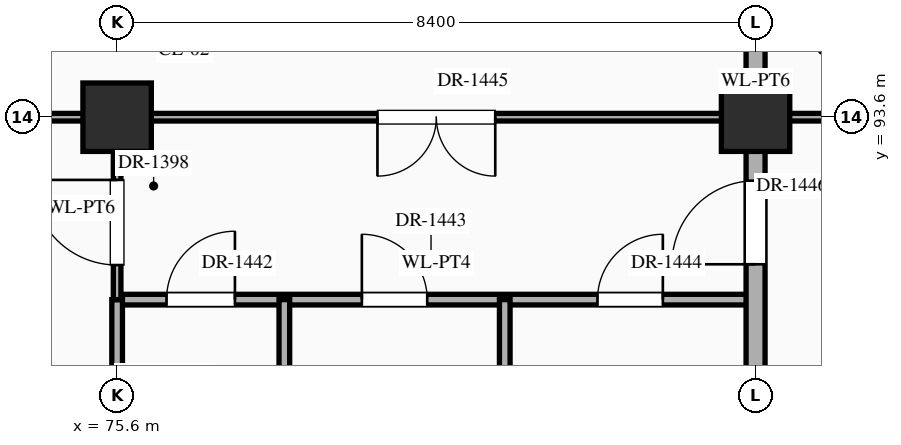
"""IFC4 building model, lengths in metres.
Left out: names, types, materials, properties, quantities, classifications, styles, units other than length and angle.
Written with IfcOpenShell. Run it as: python <this file> out.ifc"""

import sys

from ifc_helpers import new_model, si_unit, direction, frame, frame_2d, origin, origin_2d, place, context, subcontext, project, spatial, rectangle, extrude, element, fill, save


model = new_model("IFC4")
c1 = context("Model", 3, precision=1e-05, world=origin(), true_north=direction((0.0, 1.0)))
c2 = subcontext(c1, "Body", "Model", "MODEL_VIEW")
j1 = project(units=[si_unit("LENGTHUNIT", "METRE"), si_unit("PLANEANGLEUNIT", "RADIAN")], contexts=[c1])
p1 = place(None, origin())
s1 = spatial("IfcSite", under=j1, at=p1, CompositionType="ELEMENT")
p2 = place(p1, origin())
s2 = spatial("IfcBuilding", under=s1, at=p2, CompositionType="ELEMENT")
p3 = place(p2, frame((0.0, 0.0, 10.8)))
s3 = spatial("IfcBuildingStorey", under=s2, at=p3, CompositionType="ELEMENT", Elevation=10.8)
for number, where, z_axis, x_axis in (
    (1, (75.6, 93.6, 0.0), (0.0, 0.0, 1.0), (1.0, 0.0, 0.0)),
    (2, (84.0, 93.6, 0.0), (0.0, 0.0, 1.0), (1.0, 0.0, 0.0)),
):
    element("IfcColumn", number, at=place(p3, frame(where, z_axis=z_axis, x_axis=x_axis)), inside=s3, PredefinedType="COLUMN", context=c2, shape_type="SweptSolid", body=[
        extrude(rectangle(XDim=0.9, YDim=0.9, at=origin_2d()), origin(), (0.0, 0.0, 1.0), 5.4),
    ])
p4 = place(p3, frame((75.6, 91.2, 0.0), z_axis=(0.0, 0.0, 1.0), x_axis=(1.0, 0.0, 0.0)))
e3 = element("IfcWall", 3, at=p4, inside=s3, PredefinedType="STANDARD", context=c2, shape_type="SweptSolid", body=[
    extrude(rectangle(XDim=8.4, YDim=0.14, at=frame_2d((4.2, 0.0))), origin(), (0.0, 0.0, 1.0), 5.12),
])
p5 = place(p4, frame((0.65, 0.0, 0.0)))
e4 = element("IfcOpeningElement", 4, at=p5, cuts=e3, PredefinedType="OPENING", context=c2, shape_type="SweptSolid", body=[
    extrude(rectangle(XDim=0.9, YDim=2.15, at=frame_2d((0.45, 1.075))), frame((0.0, 0.082, 0.0), z_axis=(0.0, -1.0, 0.0), x_axis=(1.0, 0.0, 0.0)), (0.0, 0.0, 1.0), 0.164),
])
p6 = place(p4, frame((3.22, 0.0, 0.0)))
e5 = element("IfcOpeningElement", 5, at=p6, cuts=e3, PredefinedType="OPENING", context=c2, shape_type="SweptSolid", body=[
    extrude(rectangle(XDim=0.86, YDim=2.1, at=frame_2d((0.43, 1.05))), frame((0.0, 0.082, 0.0), z_axis=(0.0, -1.0, 0.0), x_axis=(1.0, 0.0, 0.0)), (0.0, 0.0, 1.0), 0.164),
])
p7 = place(p4, frame((6.32, 0.0, 0.0)))
e6 = element("IfcOpeningElement", 6, at=p7, cuts=e3, PredefinedType="OPENING", context=c2, shape_type="SweptSolid", body=[
    extrude(rectangle(XDim=0.86, YDim=2.1, at=frame_2d((0.43, 1.05))), frame((0.0, 0.082, 0.0), z_axis=(0.0, -1.0, 0.0), x_axis=(1.0, 0.0, 0.0)), (0.0, 0.0, 1.0), 0.164),
])
p8 = place(p3, frame((67.2, 93.6, 0.0), z_axis=(0.0, 0.0, 1.0), x_axis=(1.0, 0.0, 0.0)))
e7 = element("IfcWall", 7, at=p8, inside=s3, PredefinedType="STANDARD", context=c2, shape_type="SweptSolid", body=[
    extrude(rectangle(XDim=33.6, YDim=0.1, at=frame_2d((16.8, 0.0))), origin(), (0.0, 0.0, 1.0), 4.27),
])
p9 = place(p8, frame((3.475, 0.0, 0.0)))
e8 = element("IfcOpeningElement", 8, at=p9, cuts=e7, PredefinedType="OPENING", context=c2, shape_type="SweptSolid", body=[
    extrude(rectangle(XDim=1.45, YDim=2.3, at=frame_2d((0.725, 1.15))), frame((0.0, 0.062, 0.0), z_axis=(0.0, -1.0, 0.0), x_axis=(1.0, 0.0, 0.0)), (0.0, 0.0, 1.0), 0.124),
])
p10 = place(p8, frame((28.45, 0.0, 0.0)))
e9 = element("IfcOpeningElement", 9, at=p10, cuts=e7, PredefinedType="OPENING", context=c2, shape_type="SweptSolid", body=[
    extrude(rectangle(XDim=1.9, YDim=2.5, at=frame_2d((0.95, 1.25))), frame((0.0, 0.062, 0.0), z_axis=(0.0, -1.0, 0.0), x_axis=(1.0, 0.0, 0.0)), (0.0, 0.0, 1.0), 0.124),
])
p11 = place(p8, frame((11.825, 0.0, 0.0)))
e10 = element("IfcOpeningElement", 10, at=p11, cuts=e7, PredefinedType="OPENING", context=c2, shape_type="SweptSolid", body=[
    extrude(rectangle(XDim=1.55, YDim=2.35, at=frame_2d((0.775, 1.175))), frame((0.0, 0.062, 0.0), z_axis=(0.0, -1.0, 0.0), x_axis=(1.0, 0.0, 0.0)), (0.0, 0.0, 1.0), 0.124),
])
p12 = place(p8, frame((17.785, 0.0, 0.0)))
e11 = element("IfcOpeningElement", 11, at=p12, cuts=e7, PredefinedType="OPENING", context=c2, shape_type="SweptSolid", body=[
    extrude(rectangle(XDim=1.2, YDim=2.35, at=frame_2d((0.6, 1.175))), frame((0.0, 0.062, 0.0), z_axis=(0.0, -1.0, 0.0), x_axis=(1.0, 0.0, 0.0)), (0.0, 0.0, 1.0), 0.124),
])
p13 = place(p8, frame((20.38, 0.0, 0.0)))
e12 = element("IfcOpeningElement", 12, at=p13, cuts=e7, PredefinedType="OPENING", context=c2, shape_type="SweptSolid", body=[
    extrude(rectangle(XDim=1.24, YDim=2.3, at=frame_2d((0.62, 1.15))), frame((0.0, 0.062, 0.0), z_axis=(0.0, -1.0, 0.0), x_axis=(1.0, 0.0, 0.0)), (0.0, 0.0, 1.0), 0.124),
])
p14 = place(p8, frame((22.975, 0.0, 0.0)))
e13 = element("IfcOpeningElement", 13, at=p14, cuts=e7, PredefinedType="OPENING", context=c2, shape_type="SweptSolid", body=[
    extrude(rectangle(XDim=1.28, YDim=2.35, at=frame_2d((0.64, 1.175))), frame((0.0, 0.062, 0.0), z_axis=(0.0, -1.0, 0.0), x_axis=(1.0, 0.0, 0.0)), (0.0, 0.0, 1.0), 0.124),
])
p15 = place(p3, frame((75.6, 89.2, 0.0), z_axis=(0.0, 0.0, 1.0), x_axis=(0.0, 1.0, 0.0)))
e14 = element("IfcWall", 14, at=p15, inside=s3, PredefinedType="STANDARD", context=c2, shape_type="SweptSolid", body=[
    extrude(rectangle(XDim=2.0, YDim=0.14, at=frame_2d((1.0, 0.0))), origin(), (0.0, 0.0, 1.0), 4.37),
])
p16 = place(p3, frame((75.6, 91.2, 0.0), z_axis=(0.0, 0.0, 1.0), x_axis=(0.0, 1.0, 0.0)))
e15 = element("IfcWall", 15, at=p16, inside=s3, PredefinedType="STANDARD", context=c2, shape_type="SweptSolid", body=[
    extrude(rectangle(XDim=2.4, YDim=0.1, at=frame_2d((1.2, 0.0))), origin(), (0.0, 0.0, 1.0), 4.37),
])
p17 = place(p16, frame((0.455, 0.0, 0.0)))
e16 = element("IfcOpeningElement", 16, at=p17, cuts=e15, PredefinedType="OPENING", context=c2, shape_type="SweptSolid", body=[
    extrude(rectangle(XDim=1.12, YDim=2.25, at=frame_2d((0.56, 1.125))), frame((0.0, 0.062, 0.0), z_axis=(0.0, -1.0, 0.0), x_axis=(1.0, 0.0, 0.0)), (0.0, 0.0, 1.0), 0.124),
])
for number, where, z_axis, x_axis in (
    (17, (77.8, 86.4, 0.0), (0.0, 0.0, 1.0), (0.0, 1.0, 0.0)),
    (18, (80.7, 86.4, 0.0), (0.0, 0.0, 1.0), (0.0, 1.0, 0.0)),
):
    element("IfcWall", number, at=place(p3, frame(where, z_axis=z_axis, x_axis=x_axis)), inside=s3, PredefinedType="STANDARD", context=c2, shape_type="SweptSolid", body=[
        extrude(rectangle(XDim=4.8, YDim=0.14, at=frame_2d((2.4, 0.0))), origin(), (0.0, 0.0, 1.0), 5.12),
    ])
p18 = place(p3, frame((84.0, 79.2, 0.0), z_axis=(0.0, 0.0, 1.0), x_axis=(0.0, 1.0, 0.0)))
e19 = element("IfcWall", 19, at=p18, inside=s3, PredefinedType="STANDARD", context=c2, shape_type="SweptSolid", body=[
    extrude(rectangle(XDim=35.96, YDim=0.25, at=frame_2d((17.98, 0.0))), origin(), (0.0, 0.0, 1.0), 4.37),
])
p19 = place(p18, frame((22.835, 0.0, 0.0)))
e20 = element("IfcOpeningElement", 20, at=p19, cuts=e19, PredefinedType="OPENING", context=c2, shape_type="SweptSolid", body=[
    extrude(rectangle(XDim=1.5, YDim=2.25, at=frame_2d((0.75, 1.125))), frame((0.0, 0.137, 0.0), z_axis=(0.0, -1.0, 0.0), x_axis=(1.0, 0.0, 0.0)), (0.0, 0.0, 1.0), 0.274),
])
p20 = place(p18, frame((12.465, 0.0, 0.0)))
e21 = element("IfcOpeningElement", 21, at=p20, cuts=e19, PredefinedType="OPENING", context=c2, shape_type="SweptSolid", body=[
    extrude(rectangle(XDim=1.1, YDim=2.2, at=frame_2d((0.55, 1.1))), frame((0.0, 0.137, 0.0), z_axis=(0.0, -1.0, 0.0), x_axis=(1.0, 0.0, 0.0)), (0.0, 0.0, 1.0), 0.274),
])
p21 = place(p18, frame((15.31, 0.0, 0.0)))
e22 = element("IfcOpeningElement", 22, at=p21, cuts=e19, PredefinedType="OPENING", context=c2, shape_type="SweptSolid", body=[
    extrude(rectangle(XDim=0.95, YDim=2.15, at=frame_2d((0.475, 1.075))), frame((0.0, 0.137, 0.0), z_axis=(0.0, -1.0, 0.0), x_axis=(1.0, 0.0, 0.0)), (0.0, 0.0, 1.0), 0.274),
])
p22 = place(p18, frame((25.915, 0.0, 0.0)))
e23 = element("IfcOpeningElement", 23, at=p22, cuts=e19, PredefinedType="OPENING", context=c2, shape_type="SweptSolid", body=[
    extrude(rectangle(XDim=1.8, YDim=2.35, at=frame_2d((0.9, 1.175))), frame((0.0, 0.137, 0.0), z_axis=(0.0, -1.0, 0.0), x_axis=(1.0, 0.0, 0.0)), (0.0, 0.0, 1.0), 0.274),
])
p23 = place(p18, frame((29.71, 0.0, 0.0)))
e24 = element("IfcOpeningElement", 24, at=p23, cuts=e19, PredefinedType="OPENING", context=c2, shape_type="SweptSolid", body=[
    extrude(rectangle(XDim=0.95, YDim=2.15, at=frame_2d((0.475, 1.075))), frame((0.0, 0.137, 0.0), z_axis=(0.0, -1.0, 0.0), x_axis=(1.0, 0.0, 0.0)), (0.0, 0.0, 1.0), 0.274),
])
p24 = place(p18, frame((5.265, 0.0, 0.0)))
e25 = element("IfcOpeningElement", 25, at=p24, cuts=e19, PredefinedType="OPENING", context=c2, shape_type="SweptSolid", body=[
    extrude(rectangle(XDim=1.1, YDim=2.2, at=frame_2d((0.55, 1.1))), frame((0.0, 0.137, 0.0), z_axis=(0.0, -1.0, 0.0), x_axis=(1.0, 0.0, 0.0)), (0.0, 0.0, 1.0), 0.274),
])
p25 = place(p17, origin())
e26 = element("IfcDoor", 26, at=p25, inside=s3, OperationType="SINGLE_SWING_RIGHT", PredefinedType="DOOR", context=c2, shape_type="SweptSolid", body=[
    extrude(rectangle(XDim=1.12, YDim=2.25, at=frame_2d((0.56, 1.125))), frame((0.0, 0.025, 0.0), z_axis=(0.0, -1.0, 0.0), x_axis=(1.0, 0.0, 0.0)), (0.0, 0.0, 1.0), 0.05),
])
fill(e16, e26)
p26 = place(p5, origin())
e27 = element("IfcDoor", 27, at=p26, inside=s3, OperationType="SINGLE_SWING_RIGHT", PredefinedType="DOOR", context=c2, shape_type="SweptSolid", body=[
    extrude(rectangle(XDim=0.9, YDim=2.15, at=frame_2d((0.45, 1.075))), frame((0.0, 0.025, 0.0), z_axis=(0.0, -1.0, 0.0), x_axis=(1.0, 0.0, 0.0)), (0.0, 0.0, 1.0), 0.05),
])
fill(e4, e27)
p27 = place(p6, origin())
e28 = element("IfcDoor", 28, at=p27, inside=s3, OperationType="SINGLE_SWING_LEFT", PredefinedType="DOOR", context=c2, shape_type="SweptSolid", body=[
    extrude(rectangle(XDim=0.86, YDim=2.1, at=frame_2d((0.43, 1.05))), frame((0.0, 0.025, 0.0), z_axis=(0.0, -1.0, 0.0), x_axis=(1.0, 0.0, 0.0)), (0.0, 0.0, 1.0), 0.05),
])
fill(e5, e28)
p28 = place(p7, origin())
e29 = element("IfcDoor", 29, at=p28, inside=s3, OperationType="SINGLE_SWING_RIGHT", PredefinedType="DOOR", context=c2, shape_type="SweptSolid", body=[
    extrude(rectangle(XDim=0.86, YDim=2.1, at=frame_2d((0.43, 1.05))), frame((0.0, 0.025, 0.0), z_axis=(0.0, -1.0, 0.0), x_axis=(1.0, 0.0, 0.0)), (0.0, 0.0, 1.0), 0.05),
])
fill(e6, e29)
p29 = place(p11, frame((1.55, 0.0, 0.0), z_axis=(0.0, 0.0, 1.0), x_axis=(-1.0, 0.0, 0.0)))
e30 = element("IfcDoor", 30, at=p29, inside=s3, OperationType="DOUBLE_DOOR_SINGLE_SWING", PredefinedType="DOOR", context=c2, shape_type="SweptSolid", body=[
    extrude(rectangle(XDim=1.55, YDim=2.35, at=frame_2d((0.775, 1.175))), frame((0.0, 0.025, 0.0), z_axis=(0.0, -1.0, 0.0), x_axis=(1.0, 0.0, 0.0)), (0.0, 0.0, 1.0), 0.05),
])
fill(e10, e30)
p30 = place(p20, origin())
e31 = element("IfcDoor", 31, at=p30, inside=s3, OperationType="SINGLE_SWING_LEFT", PredefinedType="DOOR", context=c2, shape_type="SweptSolid", body=[
    extrude(rectangle(XDim=1.1, YDim=2.2, at=frame_2d((0.55, 1.1))), frame((0.0, 0.025, 0.0), z_axis=(0.0, -1.0, 0.0), x_axis=(1.0, 0.0, 0.0)), (0.0, 0.0, 1.0), 0.05),
])
fill(e21, e31)
save(model, sys.argv[1])
